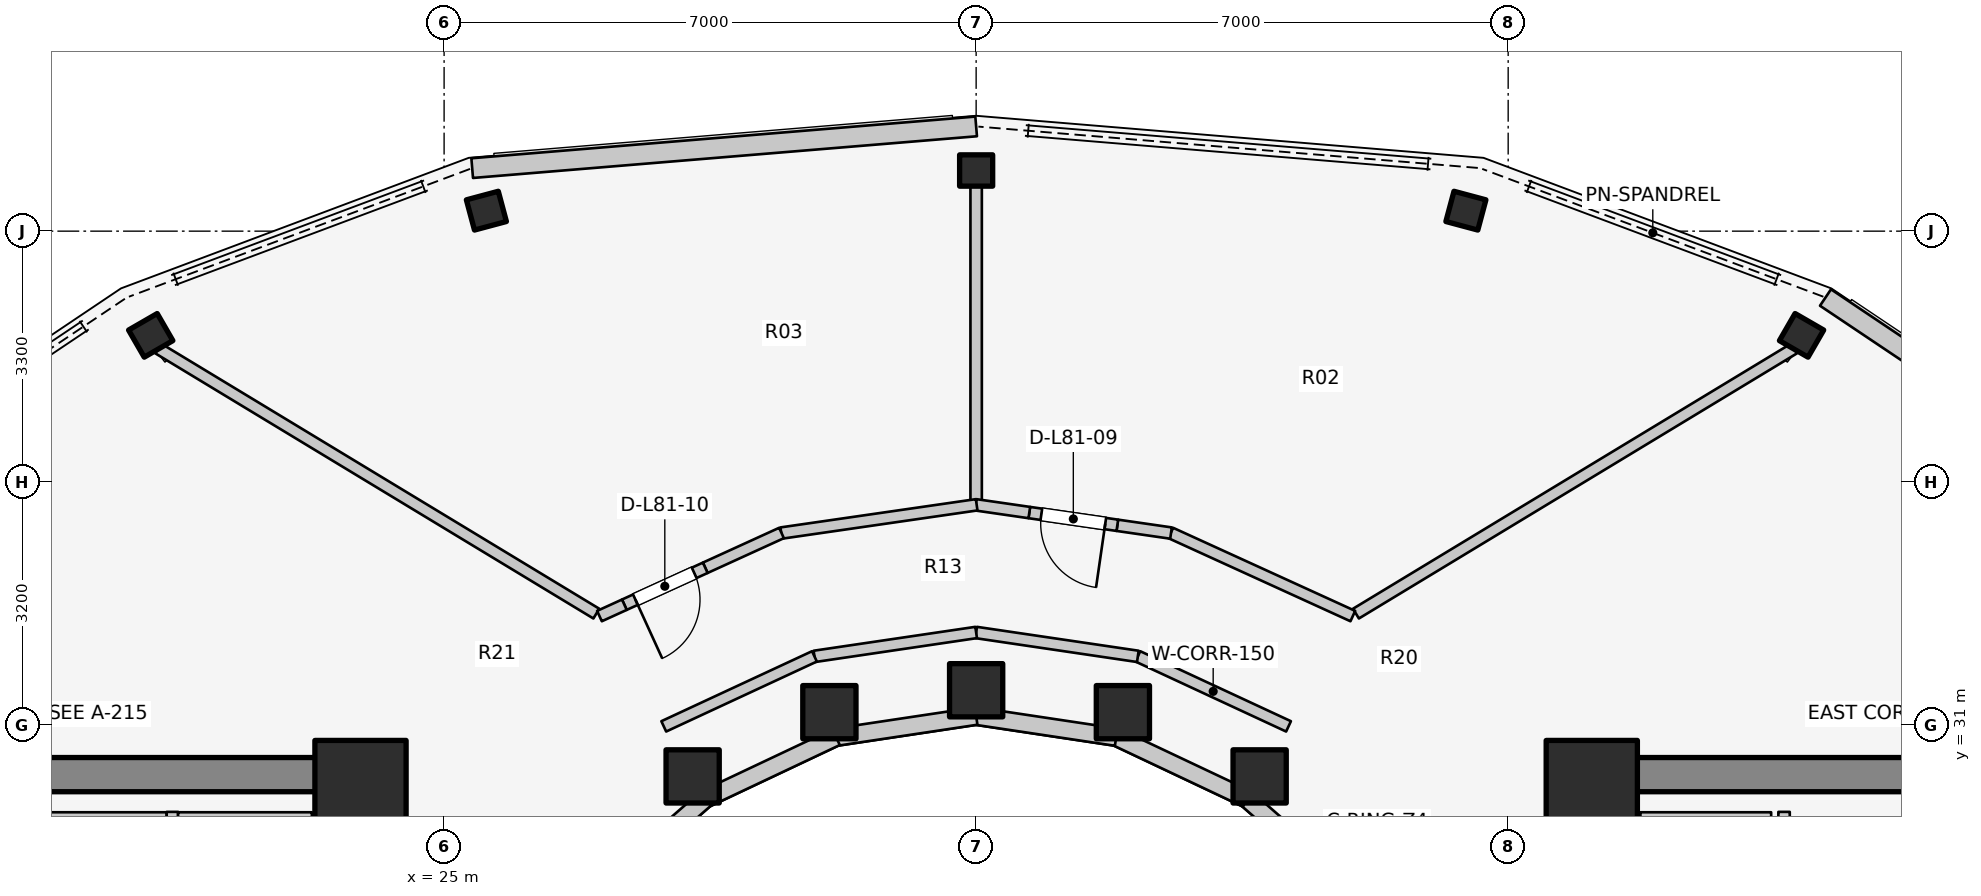
"""IFC4 building model, lengths in metres.
Left out: names, types, materials, properties, quantities, classifications, styles, units other than length and angle.
Written with IfcOpenShell. Run it as: python <this file> out.ifc"""

import sys

from ifc_helpers import new_model, si_unit, direction, frame, frame_2d, origin, origin_2d, place, context, subcontext, project, spatial, rectangle, i_section, extrude, element, fill, save


model = new_model("IFC4")
c1 = context("Model", 3, precision=1e-05, world=origin(), true_north=direction((0.0, 1.0)))
c2 = subcontext(c1, "Body", "Model", "MODEL_VIEW")
j1 = project(units=[si_unit("LENGTHUNIT", "METRE"), si_unit("PLANEANGLEUNIT", "RADIAN")], contexts=[c1])
p1 = place(None, origin())
s1 = spatial("IfcSite", under=j1, at=p1, CompositionType="ELEMENT")
p2 = place(p1, origin())
s2 = spatial("IfcBuilding", under=s1, at=p2, CompositionType="ELEMENT")
p3 = place(p2, frame((0.0, 0.0, 266.8)))
s3 = spatial("IfcBuildingStorey", under=s2, at=p3, CompositionType="ELEMENT", Elevation=266.8)
for number, where, z_axis, x_axis in (
    (1, (19.65, 30.35, 0.0), (0.0, 0.0, 1.0), (1.0, 0.0, 0.0)),
    (2, (39.85, 30.35, 0.0), (0.0, 0.0, 1.0), (1.0, 0.0, 0.0)),
):
    element("IfcWall", number, at=place(p3, frame(where, z_axis=z_axis, x_axis=x_axis)), inside=s3, PredefinedType="SHEAR", context=c2, shape_type="SweptSolid", body=[
        extrude(rectangle(XDim=4.5, YDim=0.45, at=frame_2d((2.25, 0.0))), origin(), (0.0, 0.0, 1.0), 3.2),
    ])
for number, where, z_axis, x_axis in (
    (3, (23.9, 30.2, 0.0), (0.0, 0.0, 1.0), (1.0, 0.0, 0.0)),
    (4, (40.1, 30.2, 0.0), (0.0, 0.0, 1.0), (1.0, 0.0, 0.0)),
):
    element("IfcColumn", number, at=place(p3, frame(where, z_axis=z_axis, x_axis=x_axis)), inside=s3, PredefinedType="COLUMN", context=c2, shape_type="SweptSolid", body=[
        extrude(rectangle(XDim=1.2, YDim=1.2, at=origin_2d()), origin(), (0.0, 0.0, 1.0), 3.2),
    ])
p4 = place(p3, frame((35.73, 30.327, 0.0), z_axis=(0.0, 0.0, 1.0), x_axis=(1.0, 0.0, 0.0)))
e5 = element("IfcColumn", 5, at=p4, inside=s3, PredefinedType="COLUMN", context=c2, shape_type="SweptSolid", body=[
    extrude(rectangle(XDim=0.7, YDim=0.7, at=origin_2d()), origin(), (0.0, 0.0, 1.0), 3.2),
])
p5 = place(p3, frame((42.86, 36.129, 0.0), z_axis=(0.0, 0.0, 1.0), x_axis=(0.5, 0.866025403784, 0.0)))
e6 = element("IfcColumn", 6, at=p5, inside=s3, PredefinedType="COLUMN", context=c2, shape_type="SweptSolid", body=[
    extrude(i_section(OverallWidth=0.412, OverallDepth=0.435, WebThickness=0.036, FlangeThickness=0.057, FilletRadius=0.025, at=origin_2d()), origin(), (0.0, 0.0, 1.0), 3.2),
])
p6 = place(p3, frame((33.931, 31.172, 0.0), z_axis=(0.0, 0.0, 1.0), x_axis=(1.0, 0.0, 0.0)))
e7 = element("IfcColumn", 7, at=p6, inside=s3, PredefinedType="COLUMN", context=c2, shape_type="SweptSolid", body=[
    extrude(rectangle(XDim=0.7, YDim=0.7, at=origin_2d()), origin(), (0.0, 0.0, 1.0), 3.2),
])
p7 = place(p3, frame((38.444, 37.77, 0.0), z_axis=(0.0, 0.0, 1.0), x_axis=(0.258819045103, 0.965925826289, 0.0)))
e8 = element("IfcColumn", 8, at=p7, inside=s3, PredefinedType="COLUMN", context=c2, shape_type="SweptSolid", body=[
    extrude(i_section(OverallWidth=0.412, OverallDepth=0.435, WebThickness=0.036, FlangeThickness=0.057, FilletRadius=0.025, at=origin_2d()), origin(), (0.0, 0.0, 1.0), 3.2),
])
p8 = place(p3, frame((32.0, 31.46, 0.0), z_axis=(0.0, 0.0, 1.0), x_axis=(1.0, 0.0, 0.0)))
e9 = element("IfcColumn", 9, at=p8, inside=s3, PredefinedType="COLUMN", context=c2, shape_type="SweptSolid", body=[
    extrude(rectangle(XDim=0.7, YDim=0.7, at=origin_2d()), origin(), (0.0, 0.0, 1.0), 3.2),
])
p9 = place(p3, frame((32.0, 38.298, 0.0), z_axis=(0.0, 0.0, 1.0), x_axis=(0.0, 1.0, 0.0)))
e10 = element("IfcColumn", 10, at=p9, inside=s3, PredefinedType="COLUMN", context=c2, shape_type="SweptSolid", body=[
    extrude(i_section(OverallWidth=0.412, OverallDepth=0.435, WebThickness=0.036, FlangeThickness=0.057, FilletRadius=0.025, at=origin_2d()), origin(), (0.0, 0.0, 1.0), 3.2),
])
p10 = place(p3, frame((30.069, 31.172, 0.0), z_axis=(0.0, 0.0, 1.0), x_axis=(1.0, 0.0, 0.0)))
e11 = element("IfcColumn", 11, at=p10, inside=s3, PredefinedType="COLUMN", context=c2, shape_type="SweptSolid", body=[
    extrude(rectangle(XDim=0.7, YDim=0.7, at=origin_2d()), origin(), (0.0, 0.0, 1.0), 3.2),
])
p11 = place(p3, frame((25.556, 37.77, 0.0), z_axis=(0.0, 0.0, 1.0), x_axis=(-0.258819045103, 0.965925826289, 0.0)))
e12 = element("IfcColumn", 12, at=p11, inside=s3, PredefinedType="COLUMN", context=c2, shape_type="SweptSolid", body=[
    extrude(i_section(OverallWidth=0.412, OverallDepth=0.435, WebThickness=0.036, FlangeThickness=0.057, FilletRadius=0.025, at=origin_2d()), origin(), (0.0, 0.0, 1.0), 3.2),
])
p12 = place(p3, frame((28.27, 30.327, 0.0), z_axis=(0.0, 0.0, 1.0), x_axis=(1.0, 0.0, 0.0)))
e13 = element("IfcColumn", 13, at=p12, inside=s3, PredefinedType="COLUMN", context=c2, shape_type="SweptSolid", body=[
    extrude(rectangle(XDim=0.7, YDim=0.7, at=origin_2d()), origin(), (0.0, 0.0, 1.0), 3.2),
])
p13 = place(p3, frame((21.14, 36.129, 0.0), z_axis=(0.0, 0.0, 1.0), x_axis=(-0.5, 0.866025403784, 0.0)))
e14 = element("IfcColumn", 14, at=p13, inside=s3, PredefinedType="COLUMN", context=c2, shape_type="SweptSolid", body=[
    extrude(i_section(OverallWidth=0.412, OverallDepth=0.435, WebThickness=0.036, FlangeThickness=0.057, FilletRadius=0.025, at=origin_2d()), origin(), (0.0, 0.0, 1.0), 3.2),
])
p14 = place(p3, frame((37.035, 28.742, 0.0), z_axis=(0.0, 0.0, 1.0), x_axis=(-0.752576694707, 0.658504607869, 0.0)))
e15 = element("IfcWall", 15, at=p14, inside=s3, PredefinedType="STANDARD", context=c2, shape_type="SweptSolid", body=[
    extrude(rectangle(XDim=1.959, YDim=0.23, at=frame_2d((0.98, 0.0))), origin(), (0.0, 0.0, 1.0), 1.32),
])
p15 = place(p3, frame((35.56, 30.032, 0.0), z_axis=(0.0, 0.0, 1.0), x_axis=(-0.904179699603, 0.427152280606, 0.0)))
e16 = element("IfcWall", 16, at=p15, inside=s3, PredefinedType="STANDARD", context=c2, shape_type="SweptSolid", body=[
    extrude(rectangle(XDim=1.899, YDim=0.23, at=frame_2d((0.95, 0.0))), origin(), (0.0, 0.0, 1.0), 1.32),
])
for number, where, z_axis, x_axis in (
    (17, (33.843, 30.843, 0.0), (0.0, 0.0, 1.0), (-0.989, 0.149, 0.0)),
    (18, (32.0, 31.12, 0.0), (0.0, 0.0, 1.0), (-0.989, -0.149, 0.0)),
):
    element("IfcWall", number, at=place(p3, frame(where, z_axis=z_axis, x_axis=x_axis)), inside=s3, PredefinedType="STANDARD", context=c2, shape_type="SweptSolid", body=[
        extrude(rectangle(XDim=1.864, YDim=0.23, at=frame_2d((0.932, 0.0))), origin(), (0.0, 0.0, 1.0), 1.32),
    ])
p16 = place(p3, frame((30.157, 30.843, 0.0), z_axis=(0.0, 0.0, 1.0), x_axis=(-0.904179699603, -0.427152280606, 0.0)))
e19 = element("IfcWall", 19, at=p16, inside=s3, PredefinedType="STANDARD", context=c2, shape_type="SweptSolid", body=[
    extrude(rectangle(XDim=1.899, YDim=0.23, at=frame_2d((0.95, 0.0))), origin(), (0.0, 0.0, 1.0), 1.32),
])
p17 = place(p3, frame((28.44, 30.032, 0.0), z_axis=(0.0, 0.0, 1.0), x_axis=(-0.752576694707, -0.658504607869, 0.0)))
e20 = element("IfcWall", 20, at=p17, inside=s3, PredefinedType="STANDARD", context=c2, shape_type="SweptSolid", body=[
    extrude(rectangle(XDim=1.959, YDim=0.23, at=frame_2d((0.98, 0.0))), origin(), (0.0, 0.0, 1.0), 1.32),
])
p18 = place(p3, frame((46.647, 34.3, 0.0), z_axis=(0.0, 0.0, 1.0), x_axis=(-0.830699736256, 0.556720709319, 0.0)))
e21 = element("IfcWall", 21, at=p18, inside=s3, PredefinedType="STANDARD", context=c2, shape_type="SweptSolid", body=[
    extrude(rectangle(XDim=4.179, YDim=0.26, at=frame_2d((2.09, 0.0))), origin(), (0.0, 0.0, 1.0), 1.32),
])
p19 = place(p3, frame((32.0, 38.878, 0.0), z_axis=(0.0, 0.0, 1.0), x_axis=(-0.996594930521, -0.08245328653, 0.0)))
e22 = element("IfcWall", 22, at=p19, inside=s3, PredefinedType="STANDARD", context=c2, shape_type="SweptSolid", body=[
    extrude(rectangle(XDim=6.653, YDim=0.26, at=frame_2d((3.327, 0.0))), origin(), (0.0, 0.0, 1.0), 1.32),
])
p20 = place(p3, frame((19.59, 29.78, 0.0), z_axis=(0.0, 0.0, 1.0), x_axis=(1.0, 0.0, 0.0)))
e23 = element("IfcWall", 23, at=p20, inside=s3, PredefinedType="SOLIDWALL", context=c2, shape_type="SweptSolid", body=[
    extrude(rectangle(XDim=1.76, YDim=0.15, at=frame_2d((0.88, 0.0))), origin(), (0.0, 0.0, 1.0), 2.915),
])
p21 = place(p3, frame((21.425, 27.14, 0.0), z_axis=(0.0, 0.0, 1.0), x_axis=(0.0, 1.0, 0.0)))
e24 = element("IfcWall", 24, at=p21, inside=s3, PredefinedType="SOLIDWALL", context=c2, shape_type="SweptSolid", body=[
    extrude(rectangle(XDim=2.72, YDim=0.15, at=frame_2d((1.36, 0.0))), origin(), (0.0, 0.0, 1.0), 2.915),
])
p22 = place(p3, frame((21.5, 29.78, 0.0), z_axis=(0.0, 0.0, 1.0), x_axis=(1.0, 0.0, 0.0)))
e25 = element("IfcWall", 25, at=p22, inside=s3, PredefinedType="SOLIDWALL", context=c2, shape_type="SweptSolid", body=[
    extrude(rectangle(XDim=1.76, YDim=0.15, at=frame_2d((0.88, 0.0))), origin(), (0.0, 0.0, 1.0), 2.915),
])
p23 = place(p3, frame((23.43, 27.14, 0.0), z_axis=(0.0, 0.0, 1.0), x_axis=(0.0, 1.0, 0.0)))
e26 = element("IfcWall", 26, at=p23, inside=s3, PredefinedType="SOLIDWALL", context=c2, shape_type="SweptSolid", body=[
    extrude(rectangle(XDim=2.72, YDim=0.15, at=frame_2d((1.36, 0.0))), origin(), (0.0, 0.0, 1.0), 2.915),
])
p24 = place(p3, frame((40.74, 29.78, 0.0), z_axis=(0.0, 0.0, 1.0), x_axis=(1.0, 0.0, 0.0)))
e27 = element("IfcWall", 27, at=p24, inside=s3, PredefinedType="SOLIDWALL", context=c2, shape_type="SweptSolid", body=[
    extrude(rectangle(XDim=1.72, YDim=0.15, at=frame_2d((0.86, 0.0))), origin(), (0.0, 0.0, 1.0), 2.915),
])
for number, where, z_axis, x_axis in (
    (28, (40.57, 27.14, 0.0), (0.0, 0.0, 1.0), (0.0, 1.0, 0.0)),
    (29, (42.63, 27.14, 0.0), (0.0, 0.0, 1.0), (0.0, 1.0, 0.0)),
):
    element("IfcWall", number, at=place(p3, frame(where, z_axis=z_axis, x_axis=x_axis)), inside=s3, PredefinedType="SOLIDWALL", context=c2, shape_type="SweptSolid", body=[
        extrude(rectangle(XDim=2.72, YDim=0.15, at=frame_2d((1.36, 0.0))), origin(), (0.0, 0.0, 1.0), 2.915),
    ])
p25 = place(p3, frame((36.11, 30.985, 0.0), z_axis=(0.0, 0.0, 1.0), x_axis=(-0.906943449489, 0.421252393975, 0.0)))
e30 = element("IfcWall", 30, at=p25, inside=s3, PredefinedType="PARTITIONING", context=c2, shape_type="SweptSolid", body=[
    extrude(rectangle(XDim=2.186, YDim=0.15, at=frame_2d((1.093, 0.0))), origin(), (0.0, 0.0, 1.0), 1.32),
])
for number, where, z_axis, x_axis in (
    (31, (34.127, 31.906, 0.0), (0.0, 0.0, 1.0), (-0.989, 0.146, 0.0)),
    (32, (32.0, 32.22, 0.0), (0.0, 0.0, 1.0), (-0.989, -0.146, 0.0)),
):
    element("IfcWall", number, at=place(p3, frame(where, z_axis=z_axis, x_axis=x_axis)), inside=s3, PredefinedType="PARTITIONING", context=c2, shape_type="SweptSolid", body=[
        extrude(rectangle(XDim=2.151, YDim=0.15, at=frame_2d((1.075, 0.0))), origin(), (0.0, 0.0, 1.0), 1.32),
    ])
p26 = place(p3, frame((29.873, 31.906, 0.0), z_axis=(0.0, 0.0, 1.0), x_axis=(-0.906943449489, -0.421252393975, 0.0)))
e33 = element("IfcWall", 33, at=p26, inside=s3, PredefinedType="PARTITIONING", context=c2, shape_type="SweptSolid", body=[
    extrude(rectangle(XDim=2.186, YDim=0.15, at=frame_2d((1.093, 0.0))), origin(), (0.0, 0.0, 1.0), 1.32),
])
p27 = place(p3, frame((36.997, 32.468, 0.0), z_axis=(0.0, 0.0, 1.0), x_axis=(0.855519935897, 0.517769870969, 0.0)))
e34 = element("IfcWall", 34, at=p27, inside=s3, PredefinedType="PARTITIONING", context=c2, shape_type="SweptSolid", body=[
    extrude(rectangle(XDim=6.736, YDim=0.15, at=frame_2d((3.368, 0.0))), origin(), (0.0, 0.0, 1.0), 1.32),
])
p28 = place(p3, frame((32.0, 33.955, 0.0), z_axis=(0.0, 0.0, 1.0), x_axis=(0.0, 1.0, 0.0)))
e35 = element("IfcWall", 35, at=p28, inside=s3, PredefinedType="PARTITIONING", context=c2, shape_type="SweptSolid", body=[
    extrude(rectangle(XDim=4.143, YDim=0.15, at=frame_2d((2.071, 0.0))), origin(), (0.0, 0.0, 1.0), 1.32),
])
p29 = place(p3, frame((27.003, 32.468, 0.0), z_axis=(0.0, 0.0, 1.0), x_axis=(-0.855519935897, 0.517769870969, 0.0)))
e36 = element("IfcWall", 36, at=p29, inside=s3, PredefinedType="PARTITIONING", context=c2, shape_type="SweptSolid", body=[
    extrude(rectangle(XDim=6.736, YDim=0.15, at=frame_2d((3.368, 0.0))), origin(), (0.0, 0.0, 1.0), 1.32),
])
p30 = place(p3, frame((36.956, 32.436, 0.0), z_axis=(0.0, 0.0, 1.0), x_axis=(-0.909736731002, 0.415185597373, 0.0)))
e37 = element("IfcWall", 37, at=p30, inside=s3, PredefinedType="PARTITIONING", context=c2, shape_type="SweptSolid", body=[
    extrude(rectangle(XDim=2.633, YDim=0.15, at=frame_2d((1.317, 0.0))), origin(), (0.0, 0.0, 1.0), 1.32),
])
p31 = place(p3, frame((34.564, 33.528, 0.0), z_axis=(0.0, 0.0, 1.0), x_axis=(-0.98967396594, 0.143336810138, 0.0)))
e38 = element("IfcWall", 38, at=p31, inside=s3, PredefinedType="PARTITIONING", context=c2, shape_type="SweptSolid", body=[
    extrude(rectangle(XDim=0.714, YDim=0.15, at=frame_2d((0.357, 0.0))), origin(), (0.0, 0.0, 1.0), 2.915),
])
p32 = place(p3, frame((33.858, 33.63, 0.0), z_axis=(0.0, 0.0, 1.0), x_axis=(-0.989701767603, 0.143144721184, 0.0)))
e39 = element("IfcWall", 39, at=p32, inside=s3, PredefinedType="PARTITIONING", context=c2, shape_type="SweptSolid", body=[
    extrude(rectangle(XDim=1.17, YDim=0.15, at=frame_2d((0.585, 0.0))), origin(), (0.0, 0.0, 1.0), 2.915),
])
p33 = place(p32, frame((0.16, 0.0, 0.0)))
e40 = element("IfcOpeningElement", 40, at=p33, cuts=e39, PredefinedType="OPENING", context=c2, shape_type="SweptSolid", body=[
    extrude(rectangle(XDim=0.85, YDim=2.05, at=frame_2d((0.425, 1.025))), frame((0.0, 0.085, 0.0), z_axis=(0.0, -1.0, 0.0), x_axis=(1.0, 0.0, 0.0)), (0.0, 0.0, 1.0), 0.17),
])
p34 = place(p3, frame((32.7, 33.798, 0.0), z_axis=(0.0, 0.0, 1.0), x_axis=(-0.989729432137, 0.142953318118, 0.0)))
e41 = element("IfcWall", 41, at=p34, inside=s3, PredefinedType="PARTITIONING", context=c2, shape_type="SweptSolid", body=[
    extrude(rectangle(XDim=0.714, YDim=0.15, at=frame_2d((0.357, 0.0))), origin(), (0.0, 0.0, 1.0), 1.32),
])
p35 = place(p3, frame((32.007, 33.9, 0.0), z_axis=(0.0, 0.0, 1.0), x_axis=(-0.989701742337, -0.143144895876, 0.0)))
e42 = element("IfcWall", 42, at=p35, inside=s3, PredefinedType="PARTITIONING", context=c2, shape_type="SweptSolid", body=[
    extrude(rectangle(XDim=2.598, YDim=0.15, at=frame_2d((1.299, 0.0))), origin(), (0.0, 0.0, 1.0), 1.32),
])
p36 = place(p3, frame((29.439, 33.529, 0.0), z_axis=(0.0, 0.0, 1.0), x_axis=(-0.909797051829, -0.415053399557, 0.0)))
e43 = element("IfcWall", 43, at=p36, inside=s3, PredefinedType="PARTITIONING", context=c2, shape_type="SweptSolid", body=[
    extrude(rectangle(XDim=1.103, YDim=0.15, at=frame_2d((0.551, 0.0))), origin(), (0.0, 0.0, 1.0), 1.32),
])
p37 = place(p3, frame((28.436, 33.071, 0.0), z_axis=(0.0, 0.0, 1.0), x_axis=(-0.90972227288, -0.415217275925, 0.0)))
e44 = element("IfcWall", 44, at=p37, inside=s3, PredefinedType="PARTITIONING", context=c2, shape_type="SweptSolid", body=[
    extrude(rectangle(XDim=1.17, YDim=0.15, at=frame_2d((0.585, 0.0))), origin(), (0.0, 0.0, 1.0), 2.11),
])
p38 = place(p37, frame((0.16, 0.0, 0.0)))
e45 = element("IfcOpeningElement", 45, at=p38, cuts=e44, PredefinedType="OPENING", context=c2, shape_type="SweptSolid", body=[
    extrude(rectangle(XDim=0.85, YDim=2.05, at=frame_2d((0.425, 1.025))), frame((0.0, 0.085, 0.0), z_axis=(0.0, -1.0, 0.0), x_axis=(1.0, 0.0, 0.0)), (0.0, 0.0, 1.0), 0.17),
])
p39 = place(p3, frame((27.372, 32.585, 0.0), z_axis=(0.0, 0.0, 1.0), x_axis=(-0.909598918169, -0.415487434305, 0.0)))
e46 = element("IfcWall", 46, at=p39, inside=s3, PredefinedType="PARTITIONING", context=c2, shape_type="SweptSolid", body=[
    extrude(rectangle(XDim=0.36, YDim=0.15, at=frame_2d((0.18, 0.0))), origin(), (0.0, 0.0, 1.0), 2.915),
])
p40 = place(p33, origin())
e47 = element("IfcDoor", 47, at=p40, inside=s3, OperationType="SINGLE_SWING_LEFT", PredefinedType="DOOR", context=c2, shape_type="SweptSolid", body=[
    extrude(rectangle(XDim=0.85, YDim=2.05, at=frame_2d((0.425, 1.025))), frame((0.0, 0.025, 0.0), z_axis=(0.0, -1.0, 0.0), x_axis=(1.0, 0.0, 0.0)), (0.0, 0.0, 1.0), 0.05),
])
fill(e40, e47)
p41 = place(p38, origin())
e48 = element("IfcDoor", 48, at=p41, inside=s3, OperationType="SINGLE_SWING_RIGHT", PredefinedType="DOOR", context=c2, shape_type="SweptSolid", body=[
    extrude(rectangle(XDim=0.85, YDim=2.05, at=frame_2d((0.425, 1.025))), frame((0.0, 0.025, 0.0), z_axis=(0.0, -1.0, 0.0), x_axis=(1.0, 0.0, 0.0)), (0.0, 0.0, 1.0), 0.05),
])
fill(e45, e48)
save(model, sys.argv[1])
